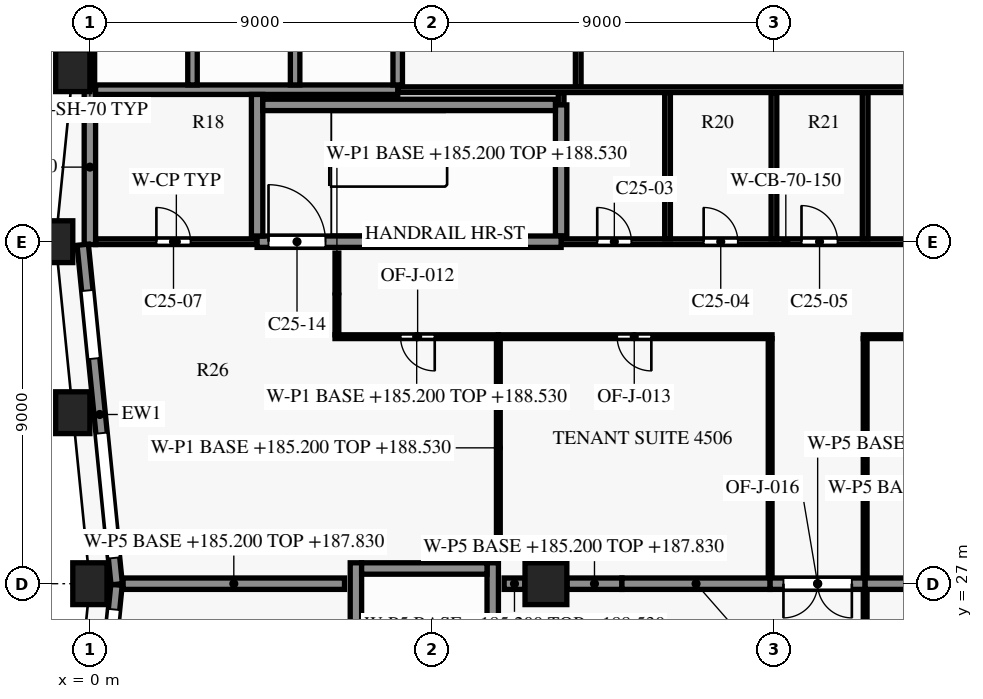
"""IFC4 building model, lengths in metres.
Left out: names, types, materials, properties, quantities, classifications, styles, units other than length and angle.
Written with IfcOpenShell. Run it as: python <this file> out.ifc"""

import sys

from ifc_helpers import new_model, si_unit, direction, frame, frame_2d, origin, origin_2d, place, context, subcontext, project, spatial, rectangle, extrude, element, fill, save


model = new_model("IFC4")
c1 = context("Model", 3, precision=1e-05, world=origin(), true_north=direction((0.0, 1.0)))
c2 = subcontext(c1, "Body", "Model", "MODEL_VIEW")
j1 = project(units=[si_unit("LENGTHUNIT", "METRE"), si_unit("PLANEANGLEUNIT", "RADIAN")], contexts=[c1])
p1 = place(None, origin())
s1 = spatial("IfcSite", under=j1, at=p1, CompositionType="ELEMENT")
p2 = place(p1, origin())
s2 = spatial("IfcBuilding", under=s1, at=p2, CompositionType="ELEMENT")
p3 = place(p2, frame((0.0, 0.0, 185.2)))
s3 = spatial("IfcBuildingStorey", under=s2, at=p3, CompositionType="ELEMENT", Elevation=185.2)
for number, where, z_axis, x_axis in (
    (1, (-0.45, 40.5, 0.0), (0.0, 0.0, 1.0), (-0.1, -0.995, 0.0)),
    (2, (-0.9, 36.0, 0.0), (0.0, 0.0, 1.0), (0.0, -1.0, 0.0)),
    (3, (-0.45, 31.5, 0.0), (0.0, 0.0, 1.0), (0.1, -0.995, 0.0)),
    (4, (0.0, 27.0, 0.0), (0.0, 0.0, 1.0), (0.0, -1.0, 0.0)),
):
    element("IfcColumn", number, at=place(p3, frame(where, z_axis=z_axis, x_axis=x_axis)), inside=s3, PredefinedType="COLUMN", context=c2, shape_type="SweptSolid", body=[
        extrude(rectangle(XDim=0.9, YDim=1.1, at=origin_2d()), origin(), (0.0, 0.0, 1.0), 3.8),
    ])
p4 = place(p3, frame((12.0, 27.0, 0.0), z_axis=(0.0, 0.0, 1.0), x_axis=(1.0, 0.0, 0.0)))
e5 = element("IfcColumn", 5, at=p4, inside=s3, PredefinedType="COLUMN", context=c2, shape_type="SweptSolid", body=[
    extrude(rectangle(XDim=1.1, YDim=1.1, at=origin_2d()), origin(), (0.0, 0.0, 1.0), 3.8),
])
p5 = place(p3, frame((0.705, 26.985, 0.0), z_axis=(0.0, 0.0, 1.0), x_axis=(-0.099533329093, 0.995034228758, 0.0)))
e6 = element("IfcWall", 6, at=p5, inside=s3, PredefinedType="SOLIDWALL", context=c2, shape_type="SweptSolid", body=[
    extrude(rectangle(XDim=8.98, YDim=0.3, at=frame_2d((4.49, 0.0))), origin(), (0.0, 0.0, 1.0), 3.15),
])
p6 = place(p5, frame((0.696, 0.0, 0.15)))
e7 = element("IfcOpeningElement", 7, at=p6, cuts=e6, PredefinedType="OPENING", context=c2, shape_type="SweptSolid", body=[
    extrude(rectangle(XDim=3.3, YDim=2.4, at=frame_2d((1.65, 1.2))), frame((0.0, 0.16, 0.0), z_axis=(0.0, -1.0, 0.0), x_axis=(1.0, 0.0, 0.0)), (0.0, 0.0, 1.0), 0.32),
])
p7 = place(p5, frame((5.969, 0.0, 0.75)))
e8 = element("IfcOpeningElement", 8, at=p7, cuts=e6, PredefinedType="OPENING", context=c2, shape_type="SweptSolid", body=[
    extrude(rectangle(XDim=1.8, YDim=1.8, at=frame_2d((0.9, 0.9))), frame((0.0, 0.16, 0.0), z_axis=(0.0, -1.0, 0.0), x_axis=(1.0, 0.0, 0.0)), (0.0, 0.0, 1.0), 0.32),
])
p8 = place(p3, frame((-0.198, 17.985, 0.0), z_axis=(0.0, 0.0, 1.0), x_axis=(0.099495688264, 0.995037993253, 0.0)))
e9 = element("IfcWall", 9, at=p8, inside=s3, PredefinedType="SOLIDWALL", context=c2, shape_type="SweptSolid", body=[
    extrude(rectangle(XDim=9.03, YDim=0.3, at=frame_2d((4.515, 0.0))), origin(), (0.0, 0.0, 1.0), 3.15),
])
p9 = place(p8, frame((1.306, 0.0, 0.75)))
e10 = element("IfcOpeningElement", 10, at=p9, cuts=e9, PredefinedType="OPENING", context=c2, shape_type="SweptSolid", body=[
    extrude(rectangle(XDim=1.8, YDim=1.8, at=frame_2d((0.9, 0.9))), frame((0.0, 0.16, 0.0), z_axis=(0.0, -1.0, 0.0), x_axis=(1.0, 0.0, 0.0)), (0.0, 0.0, 1.0), 0.32),
])
p10 = place(p8, frame((5.079, 0.0, 0.15)))
e11 = element("IfcOpeningElement", 11, at=p10, cuts=e9, PredefinedType="OPENING", context=c2, shape_type="SweptSolid", body=[
    extrude(rectangle(XDim=3.3, YDim=2.4, at=frame_2d((1.65, 1.2))), frame((0.0, 0.16, 0.0), z_axis=(0.0, -1.0, 0.0), x_axis=(1.0, 0.0, 0.0)), (0.0, 0.0, 1.0), 0.32),
])
p11 = place(p3, frame((7.15, 27.4, 0.0), z_axis=(0.0, 0.0, 1.0), x_axis=(1.0, 0.0, 0.0)))
e12 = element("IfcWall", 12, at=p11, inside=s3, PredefinedType="SHEAR", context=c2, shape_type="SweptSolid", body=[
    extrude(rectangle(XDim=3.3, YDim=0.3, at=frame_2d((1.65, 0.0))), origin(), (0.0, 0.0, 1.0), 3.5),
])
p12 = place(p3, frame((0.15, 36.0, 0.0), z_axis=(0.0, 0.0, 1.0), x_axis=(1.0, 0.0, 0.0)))
e13 = element("IfcWall", 13, at=p12, inside=s3, PredefinedType="PARTITIONING", context=c2, shape_type="SweptSolid", body=[
    extrude(rectangle(XDim=4.25, YDim=0.15, at=frame_2d((2.125, 0.0))), origin(), (0.0, 0.0, 1.0), 3.5),
])
p13 = place(p12, frame((1.6, 0.0, 0.0)))
e14 = element("IfcOpeningElement", 14, at=p13, cuts=e13, PredefinedType="OPENING", context=c2, shape_type="SweptSolid", body=[
    extrude(rectangle(XDim=0.9, YDim=2.1, at=frame_2d((0.45, 1.05))), frame((0.0, 0.085, 0.0), z_axis=(0.0, -1.0, 0.0), x_axis=(1.0, 0.0, 0.0)), (0.0, 0.0, 1.0), 0.17),
])
p14 = place(p3, frame((12.4, 36.0, 0.0), z_axis=(0.0, 0.0, 1.0), x_axis=(1.0, 0.0, 0.0)))
e15 = element("IfcWall", 15, at=p14, inside=s3, PredefinedType="SHEAR", context=c2, shape_type="SweptSolid", body=[
    extrude(rectangle(XDim=11.825, YDim=0.15, at=frame_2d((5.913, 0.0))), origin(), (0.0, 0.0, 1.0), 3.5),
])
p15 = place(p14, frame((0.95, 0.0, 0.0)))
e16 = element("IfcOpeningElement", 16, at=p15, cuts=e15, PredefinedType="OPENING", context=c2, shape_type="SweptSolid", body=[
    extrude(rectangle(XDim=0.9, YDim=2.1, at=frame_2d((0.45, 1.05))), frame((0.0, 0.085, 0.0), z_axis=(0.0, -1.0, 0.0), x_axis=(1.0, 0.0, 0.0)), (0.0, 0.0, 1.0), 0.17),
])
p16 = place(p14, frame((3.75, 0.0, 0.0)))
e17 = element("IfcOpeningElement", 17, at=p16, cuts=e15, PredefinedType="OPENING", context=c2, shape_type="SweptSolid", body=[
    extrude(rectangle(XDim=0.9, YDim=2.1, at=frame_2d((0.45, 1.05))), frame((0.0, 0.085, 0.0), z_axis=(0.0, -1.0, 0.0), x_axis=(1.0, 0.0, 0.0)), (0.0, 0.0, 1.0), 0.17),
])
p17 = place(p14, frame((6.325, 0.0, 0.0)))
e18 = element("IfcOpeningElement", 18, at=p17, cuts=e15, PredefinedType="OPENING", context=c2, shape_type="SweptSolid", body=[
    extrude(rectangle(XDim=0.95, YDim=2.1, at=frame_2d((0.475, 1.05))), frame((0.0, 0.085, 0.0), z_axis=(0.0, -1.0, 0.0), x_axis=(1.0, 0.0, 0.0)), (0.0, 0.0, 1.0), 0.17),
])
p18 = place(p14, frame((9.5, 0.0, 0.0)))
e19 = element("IfcOpeningElement", 19, at=p18, cuts=e15, PredefinedType="OPENING", context=c2, shape_type="SweptSolid", body=[
    extrude(rectangle(XDim=0.9, YDim=2.1, at=frame_2d((0.45, 1.05))), frame((0.0, 0.085, 0.0), z_axis=(0.0, -1.0, 0.0), x_axis=(1.0, 0.0, 0.0)), (0.0, 0.0, 1.0), 0.17),
])
p19 = place(p3, frame((4.4, 36.0, 0.0), z_axis=(0.0, 0.0, 1.0), x_axis=(1.0, 0.0, 0.0)))
e20 = element("IfcWall", 20, at=p19, inside=s3, PredefinedType="SHEAR", context=c2, shape_type="SweptSolid", body=[
    extrude(rectangle(XDim=8.0, YDim=0.3, at=frame_2d((4.0, 0.0))), origin(), (0.0, 0.0, 1.0), 3.5),
])
p20 = place(p19, frame((0.3, 0.0, 0.0)))
e21 = element("IfcOpeningElement", 21, at=p20, cuts=e20, PredefinedType="OPENING", context=c2, shape_type="SweptSolid", body=[
    extrude(rectangle(XDim=1.5, YDim=2.2, at=frame_2d((0.75, 1.1))), frame((0.0, 0.16, 0.0), z_axis=(0.0, -1.0, 0.0), x_axis=(1.0, 0.0, 0.0)), (0.0, 0.0, 1.0), 0.32),
])
p21 = place(p3, frame((4.55, 39.6, 0.0), z_axis=(0.0, 0.0, 1.0), x_axis=(1.0, 0.0, 0.0)))
e22 = element("IfcWall", 22, at=p21, inside=s3, PredefinedType="SHEAR", context=c2, shape_type="SweptSolid", body=[
    extrude(rectangle(XDim=7.7, YDim=0.3, at=frame_2d((3.85, 0.0))), origin(), (0.0, 0.0, 1.0), 3.5),
])
p22 = place(p3, frame((8.1, 40.0, 0.0), z_axis=(0.0, 0.0, 1.0), x_axis=(1.0, 0.0, 0.0)))
e23 = element("IfcWall", 23, at=p22, inside=s3, PredefinedType="PARTITIONING", context=c2, shape_type="SweptSolid", body=[
    extrude(rectangle(XDim=16.125, YDim=0.15, at=frame_2d((8.062, 0.0))), origin(), (0.0, 0.0, 1.0), 3.5),
])
p23 = place(p3, frame((0.15, 40.0, 0.0), z_axis=(0.0, 0.0, 1.0), x_axis=(1.0, 0.0, 0.0)))
e24 = element("IfcWall", 24, at=p23, inside=s3, PredefinedType="SHEAR", context=c2, shape_type="SweptSolid", body=[
    extrude(rectangle(XDim=7.95, YDim=0.25, at=frame_2d((3.975, 0.0))), origin(), (0.0, 0.0, 1.0), 3.5),
])
p24 = place(p3, frame((0.0, 35.925, 0.0), z_axis=(0.0, 0.0, 1.0), x_axis=(0.0, 1.0, 0.0)))
e25 = element("IfcWall", 25, at=p24, inside=s3, PredefinedType="SHEAR", context=c2, shape_type="SweptSolid", body=[
    extrude(rectangle(XDim=4.075, YDim=0.3, at=frame_2d((2.038, 0.0))), origin(), (0.0, 0.0, 1.0), 3.5),
])
p25 = place(p3, frame((0.0, 40.0, 0.0), z_axis=(0.0, 0.0, 1.0), x_axis=(0.0, 1.0, 0.0)))
e26 = element("IfcWall", 26, at=p25, inside=s3, PredefinedType="SHEAR", context=c2, shape_type="SweptSolid", body=[
    extrude(rectangle(XDim=3.325, YDim=0.25, at=frame_2d((1.663, 0.0))), origin(), (0.0, 0.0, 1.0), 3.5),
])
p26 = place(p3, frame((2.7, 40.125, 0.0), z_axis=(0.0, 0.0, 1.0), x_axis=(0.0, 1.0, 0.0)))
e27 = element("IfcWall", 27, at=p26, inside=s3, PredefinedType="SHEAR", context=c2, shape_type="SweptSolid", body=[
    extrude(rectangle(XDim=2.95, YDim=0.25, at=frame_2d((1.475, 0.0))), origin(), (0.0, 0.0, 1.0), 3.5),
])
p27 = place(p3, frame((4.4, 36.15, 0.0), z_axis=(0.0, 0.0, 1.0), x_axis=(0.0, 1.0, 0.0)))
e28 = element("IfcWall", 28, at=p27, inside=s3, PredefinedType="SHEAR", context=c2, shape_type="SweptSolid", body=[
    extrude(rectangle(XDim=3.725, YDim=0.3, at=frame_2d((1.863, 0.0))), origin(), (0.0, 0.0, 1.0), 3.5),
])
p28 = place(p3, frame((5.4, 40.125, 0.0), z_axis=(0.0, 0.0, 1.0), x_axis=(0.0, 1.0, 0.0)))
e29 = element("IfcWall", 29, at=p28, inside=s3, PredefinedType="SHEAR", context=c2, shape_type="SweptSolid", body=[
    extrude(rectangle(XDim=2.95, YDim=0.25, at=frame_2d((1.475, 0.0))), origin(), (0.0, 0.0, 1.0), 3.5),
])
p29 = place(p3, frame((7.0, 19.25, 0.0), z_axis=(0.0, 0.0, 1.0), x_axis=(0.0, 1.0, 0.0)))
e30 = element("IfcWall", 30, at=p29, inside=s3, PredefinedType="SHEAR", context=c2, shape_type="SweptSolid", body=[
    extrude(rectangle(XDim=8.3, YDim=0.3, at=frame_2d((4.15, 0.0))), origin(), (0.0, 0.0, 1.0), 3.5),
])
p30 = place(p3, frame((8.1, 40.125, 0.0), z_axis=(0.0, 0.0, 1.0), x_axis=(0.0, 1.0, 0.0)))
e31 = element("IfcWall", 31, at=p30, inside=s3, PredefinedType="SHEAR", context=c2, shape_type="SweptSolid", body=[
    extrude(rectangle(XDim=2.95, YDim=0.25, at=frame_2d((1.475, 0.0))), origin(), (0.0, 0.0, 1.0), 3.5),
])
p31 = place(p3, frame((10.6, 19.25, 0.0), z_axis=(0.0, 0.0, 1.0), x_axis=(0.0, 1.0, 0.0)))
e32 = element("IfcWall", 32, at=p31, inside=s3, PredefinedType="SHEAR", context=c2, shape_type="SweptSolid", body=[
    extrude(rectangle(XDim=8.3, YDim=0.3, at=frame_2d((4.15, 0.0))), origin(), (0.0, 0.0, 1.0), 3.5),
])
p32 = place(p31, frame((0.55, 0.0, 0.0)))
e33 = element("IfcOpeningElement", 33, at=p32, cuts=e32, PredefinedType="OPENING", context=c2, shape_type="SweptSolid", body=[
    extrude(rectangle(XDim=1.2, YDim=2.2, at=frame_2d((0.6, 1.1))), frame((0.0, 0.16, 0.0), z_axis=(0.0, -1.0, 0.0), x_axis=(1.0, 0.0, 0.0)), (0.0, 0.0, 1.0), 0.32),
])
p33 = place(p3, frame((12.4, 39.6, 0.0), z_axis=(0.0, 0.0, 1.0), x_axis=(0.0, 1.0, 0.0)))
e34 = element("IfcWall", 34, at=p33, inside=s3, PredefinedType="PARTITIONING", context=c2, shape_type="SweptSolid", body=[
    extrude(rectangle(XDim=0.325, YDim=0.15, at=frame_2d((0.163, 0.0))), origin(), (0.0, 0.0, 1.0), 3.5),
])
p34 = place(p3, frame((12.4, 36.15, 0.0), z_axis=(0.0, 0.0, 1.0), x_axis=(0.0, 1.0, 0.0)))
e35 = element("IfcWall", 35, at=p34, inside=s3, PredefinedType="SHEAR", context=c2, shape_type="SweptSolid", body=[
    extrude(rectangle(XDim=3.45, YDim=0.3, at=frame_2d((1.725, 0.0))), origin(), (0.0, 0.0, 1.0), 3.5),
])
p35 = place(p3, frame((12.85, 40.075, 0.0), z_axis=(0.0, 0.0, 1.0), x_axis=(0.0, 1.0, 0.0)))
e36 = element("IfcWall", 36, at=p35, inside=s3, PredefinedType="PARTITIONING", context=c2, shape_type="SweptSolid", body=[
    extrude(rectangle(XDim=3.05, YDim=0.15, at=frame_2d((1.525, 0.0))), origin(), (0.0, 0.0, 1.0), 3.5),
])
for number, where, z_axis, x_axis in (
    (37, (15.2, 36.075, 0.0), (0.0, 0.0, 1.0), (0.0, 1.0, 0.0)),
    (38, (18.0, 36.075, 0.0), (0.0, 0.0, 1.0), (0.0, 1.0, 0.0)),
    (39, (20.4, 36.075, 0.0), (0.0, 0.0, 1.0), (0.0, 1.0, 0.0)),
):
    element("IfcWall", number, at=place(p3, frame(where, z_axis=z_axis, x_axis=x_axis)), inside=s3, PredefinedType="PARTITIONING", context=c2, shape_type="SweptSolid", body=[
        extrude(rectangle(XDim=3.85, YDim=0.15, at=frame_2d((1.925, 0.0))), origin(), (0.0, 0.0, 1.0), 3.5),
    ])
p36 = place(p3, frame((20.4, 26.83, 0.0), z_axis=(0.0, 0.0, 1.0), x_axis=(0.0, -1.0, 0.0)))
e40 = element("IfcWall", 40, at=p36, inside=s3, PredefinedType="PARTITIONING", context=c2, shape_type="SweptSolid", body=[
    extrude(rectangle(XDim=14.48, YDim=0.1, at=frame_2d((7.24, 0.0))), origin(), (0.0, 0.0, 1.0), 2.63),
])
p37 = place(p36, frame((6.73, 0.0, 0.0)))
e41 = element("IfcOpeningElement", 41, at=p37, cuts=e40, PredefinedType="OPENING", context=c2, shape_type="SweptSolid", body=[
    extrude(rectangle(XDim=0.9, YDim=2.1, at=frame_2d((0.45, 1.05))), frame((0.0, 0.06, 0.0), z_axis=(0.0, -1.0, 0.0), x_axis=(1.0, 0.0, 0.0)), (0.0, 0.0, 1.0), 0.12),
])
p38 = place(p3, frame((0.874, 27.0, 0.0), z_axis=(0.0, 0.0, 1.0), x_axis=(1.0, 0.0, 0.0)))
e42 = element("IfcWall", 42, at=p38, inside=s3, PredefinedType="PARTITIONING", context=c2, shape_type="SweptSolid", body=[
    extrude(rectangle(XDim=5.826, YDim=0.3, at=frame_2d((2.913, 0.0))), origin(), (0.0, 0.0, 1.0), 2.63),
])
p39 = place(p3, frame((10.9, 27.0, 0.0), z_axis=(0.0, 0.0, 1.0), x_axis=(1.0, 0.0, 0.0)))
e43 = element("IfcWall", 43, at=p39, inside=s3, PredefinedType="PARTITIONING", context=c2, shape_type="SweptSolid", body=[
    extrude(rectangle(XDim=0.545, YDim=0.3, at=frame_2d((0.272, 0.0))), origin(), (0.0, 0.0, 1.0), 3.33),
])
p40 = place(p3, frame((12.555, 27.0, 0.0), z_axis=(0.0, 0.0, 1.0), x_axis=(1.0, 0.0, 0.0)))
e44 = element("IfcWall", 44, at=p40, inside=s3, PredefinedType="PARTITIONING", context=c2, shape_type="SweptSolid", body=[
    extrude(rectangle(XDim=1.445, YDim=0.3, at=frame_2d((0.723, 0.0))), origin(), (0.0, 0.0, 1.0), 2.63),
])
p41 = place(p3, frame((14.0, 27.0, 0.0), z_axis=(0.0, 0.0, 1.0), x_axis=(1.0, 0.0, 0.0)))
e45 = element("IfcWall", 45, at=p41, inside=s3, PredefinedType="PARTITIONING", context=c2, shape_type="SweptSolid", body=[
    extrude(rectangle(XDim=3.9, YDim=0.3, at=frame_2d((1.95, 0.0))), origin(), (0.0, 0.0, 1.0), 2.63),
])
p42 = place(p3, frame((20.4, 27.0, 0.0), z_axis=(0.0, 0.0, 1.0), x_axis=(-1.0, 0.0, 0.0)))
e46 = element("IfcWall", 46, at=p42, inside=s3, PredefinedType="PARTITIONING", context=c2, shape_type="SweptSolid", body=[
    extrude(rectangle(XDim=2.5, YDim=0.3, at=frame_2d((1.25, 0.0))), origin(), (0.0, 0.0, 1.0), 2.63),
])
p43 = place(p42, frame((0.35, 0.0, 0.0)))
e47 = element("IfcOpeningElement", 47, at=p43, cuts=e46, PredefinedType="OPENING", context=c2, shape_type="SweptSolid", body=[
    extrude(rectangle(XDim=1.8, YDim=2.1, at=frame_2d((0.9, 1.05))), frame((0.0, 0.16, 0.0), z_axis=(0.0, -1.0, 0.0), x_axis=(1.0, 0.0, 0.0)), (0.0, 0.0, 1.0), 0.32),
])
p44 = place(p3, frame((20.4, 27.0, 0.0), z_axis=(0.0, 0.0, 1.0), x_axis=(1.0, 0.0, 0.0)))
e48 = element("IfcWall", 48, at=p44, inside=s3, PredefinedType="PARTITIONING", context=c2, shape_type="SweptSolid", body=[
    extrude(rectangle(XDim=3.045, YDim=0.3, at=frame_2d((1.522, 0.0))), origin(), (0.0, 0.0, 1.0), 2.63),
])
p45 = place(p3, frame((17.9, 27.17, 0.0), z_axis=(0.0, 0.0, 1.0), x_axis=(0.0, 1.0, 0.0)))
e49 = element("IfcWall", 49, at=p45, inside=s3, PredefinedType="PARTITIONING", context=c2, shape_type="SweptSolid", body=[
    extrude(rectangle(XDim=6.28, YDim=0.1, at=frame_2d((3.14, 0.0))), origin(), (0.0, 0.0, 1.0), 2.63),
])
p46 = place(p3, frame((10.748, 33.45, 0.0), z_axis=(0.0, 0.0, 1.0), x_axis=(0.0, -1.0, 0.0)))
e50 = element("IfcWall", 50, at=p46, inside=s3, PredefinedType="PARTITIONING", context=c2, shape_type="SweptSolid", body=[
    extrude(rectangle(XDim=5.75, YDim=0.1, at=frame_2d((2.875, 0.0))), origin(), (0.0, 0.0, 1.0), 3.33),
])
p47 = place(p3, frame((20.4, 33.45, 0.0), z_axis=(0.0, 0.0, 1.0), x_axis=(0.0, -1.0, 0.0)))
e51 = element("IfcWall", 51, at=p47, inside=s3, PredefinedType="PARTITIONING", context=c2, shape_type="SweptSolid", body=[
    extrude(rectangle(XDim=6.28, YDim=0.1, at=frame_2d((3.14, 0.0))), origin(), (0.0, 0.0, 1.0), 2.63),
])
p48 = place(p3, frame((10.748, 33.5, 0.0), z_axis=(0.0, 0.0, 1.0), x_axis=(-1.0, 0.0, 0.0)))
e52 = element("IfcWall", 52, at=p48, inside=s3, PredefinedType="PARTITIONING", context=c2, shape_type="SweptSolid", body=[
    extrude(rectangle(XDim=4.298, YDim=0.1, at=frame_2d((2.149, 0.0))), origin(), (0.0, 0.0, 1.0), 3.33),
])
p49 = place(p48, frame((1.674, 0.0, 0.0)))
e53 = element("IfcOpeningElement", 53, at=p49, cuts=e52, PredefinedType="OPENING", context=c2, shape_type="SweptSolid", body=[
    extrude(rectangle(XDim=0.9, YDim=2.1, at=frame_2d((0.45, 1.05))), frame((0.0, 0.06, 0.0), z_axis=(0.0, -1.0, 0.0), x_axis=(1.0, 0.0, 0.0)), (0.0, 0.0, 1.0), 0.12),
])
p50 = place(p3, frame((17.95, 33.5, 0.0), z_axis=(0.0, 0.0, 1.0), x_axis=(-1.0, 0.0, 0.0)))
e54 = element("IfcWall", 54, at=p50, inside=s3, PredefinedType="PARTITIONING", context=c2, shape_type="SweptSolid", body=[
    extrude(rectangle(XDim=7.202, YDim=0.1, at=frame_2d((3.601, 0.0))), origin(), (0.0, 0.0, 1.0), 2.63),
])
p51 = place(p50, frame((3.176, 0.0, 0.0)))
e55 = element("IfcOpeningElement", 55, at=p51, cuts=e54, PredefinedType="OPENING", context=c2, shape_type="SweptSolid", body=[
    extrude(rectangle(XDim=0.9, YDim=2.1, at=frame_2d((0.45, 1.05))), frame((0.0, 0.06, 0.0), z_axis=(0.0, -1.0, 0.0), x_axis=(1.0, 0.0, 0.0)), (0.0, 0.0, 1.0), 0.12),
])
p52 = place(p3, frame((31.05, 33.5, 0.0), z_axis=(0.0, 0.0, 1.0), x_axis=(-1.0, 0.0, 0.0)))
e56 = element("IfcWall", 56, at=p52, inside=s3, PredefinedType="PARTITIONING", context=c2, shape_type="SweptSolid", body=[
    extrude(rectangle(XDim=10.7, YDim=0.1, at=frame_2d((5.35, 0.0))), origin(), (0.0, 0.0, 1.0), 2.63),
])
p53 = place(p3, frame((6.5, 33.55, 0.0), z_axis=(0.0, 0.0, 1.0), x_axis=(0.0, 1.0, 0.0)))
e57 = element("IfcWall", 57, at=p53, inside=s3, PredefinedType="PARTITIONING", context=c2, shape_type="SweptSolid", body=[
    extrude(rectangle(XDim=2.15, YDim=0.1, at=frame_2d((1.075, 0.0))), origin(), (0.0, 0.0, 1.0), 3.33),
])
p54 = place(p6, origin())
e58 = element("IfcWindow", 58, at=p54, inside=s3, PartitioningType="SINGLE_PANEL", PredefinedType="WINDOW", context=c2, shape_type="SweptSolid", body=[
    extrude(rectangle(XDim=3.3, YDim=2.4, at=frame_2d((1.65, 1.2))), frame((0.0, 0.03, 0.0), z_axis=(0.0, -1.0, 0.0), x_axis=(1.0, 0.0, 0.0)), (0.0, 0.0, 1.0), 0.06),
])
fill(e7, e58)
p55 = place(p7, origin())
e59 = element("IfcWindow", 59, at=p55, inside=s3, PartitioningType="SINGLE_PANEL", PredefinedType="WINDOW", context=c2, shape_type="SweptSolid", body=[
    extrude(rectangle(XDim=1.8, YDim=1.8, at=frame_2d((0.9, 0.9))), frame((0.0, 0.03, 0.0), z_axis=(0.0, -1.0, 0.0), x_axis=(1.0, 0.0, 0.0)), (0.0, 0.0, 1.0), 0.06),
])
fill(e8, e59)
p56 = place(p10, origin())
e60 = element("IfcWindow", 60, at=p56, inside=s3, PartitioningType="SINGLE_PANEL", PredefinedType="WINDOW", context=c2, shape_type="SweptSolid", body=[
    extrude(rectangle(XDim=3.3, YDim=2.4, at=frame_2d((1.65, 1.2))), frame((0.0, 0.03, 0.0), z_axis=(0.0, -1.0, 0.0), x_axis=(1.0, 0.0, 0.0)), (0.0, 0.0, 1.0), 0.06),
])
fill(e11, e60)
p57 = place(p15, origin())
e61 = element("IfcDoor", 61, at=p57, inside=s3, OperationType="SINGLE_SWING_RIGHT", PredefinedType="DOOR", context=c2, shape_type="SweptSolid", body=[
    extrude(rectangle(XDim=0.9, YDim=2.1, at=frame_2d((0.45, 1.05))), frame((0.0, 0.025, 0.0), z_axis=(0.0, -1.0, 0.0), x_axis=(1.0, 0.0, 0.0)), (0.0, 0.0, 1.0), 0.05),
])
fill(e16, e61)
p58 = place(p16, origin())
e62 = element("IfcDoor", 62, at=p58, inside=s3, OperationType="SINGLE_SWING_LEFT", PredefinedType="DOOR", context=c2, shape_type="SweptSolid", body=[
    extrude(rectangle(XDim=0.9, YDim=2.1, at=frame_2d((0.45, 1.05))), frame((0.0, 0.025, 0.0), z_axis=(0.0, -1.0, 0.0), x_axis=(1.0, 0.0, 0.0)), (0.0, 0.0, 1.0), 0.05),
])
fill(e17, e62)
p59 = place(p17, origin())
e63 = element("IfcDoor", 63, at=p59, inside=s3, OperationType="SINGLE_SWING_RIGHT", PredefinedType="DOOR", context=c2, shape_type="SweptSolid", body=[
    extrude(rectangle(XDim=0.95, YDim=2.1, at=frame_2d((0.475, 1.05))), frame((0.0, 0.025, 0.0), z_axis=(0.0, -1.0, 0.0), x_axis=(1.0, 0.0, 0.0)), (0.0, 0.0, 1.0), 0.05),
])
fill(e18, e63)
p60 = place(p13, origin())
e64 = element("IfcDoor", 64, at=p60, inside=s3, OperationType="SINGLE_SWING_LEFT", PredefinedType="DOOR", context=c2, shape_type="SweptSolid", body=[
    extrude(rectangle(XDim=0.9, YDim=2.1, at=frame_2d((0.45, 1.05))), frame((0.0, 0.025, 0.0), z_axis=(0.0, -1.0, 0.0), x_axis=(1.0, 0.0, 0.0)), (0.0, 0.0, 1.0), 0.05),
])
fill(e14, e64)
p61 = place(p20, origin())
e65 = element("IfcDoor", 65, at=p61, inside=s3, OperationType="SINGLE_SWING_RIGHT", PredefinedType="DOOR", context=c2, shape_type="SweptSolid", body=[
    extrude(rectangle(XDim=1.5, YDim=2.2, at=frame_2d((0.75, 1.1))), frame((0.0, 0.025, 0.0), z_axis=(0.0, -1.0, 0.0), x_axis=(1.0, 0.0, 0.0)), (0.0, 0.0, 1.0), 0.05),
])
fill(e21, e65)
p62 = place(p49, origin())
e66 = element("IfcDoor", 66, at=p62, inside=s3, OperationType="SINGLE_SWING_RIGHT", PredefinedType="DOOR", context=c2, shape_type="SweptSolid", body=[
    extrude(rectangle(XDim=0.9, YDim=2.1, at=frame_2d((0.45, 1.05))), frame((0.0, 0.025, 0.0), z_axis=(0.0, -1.0, 0.0), x_axis=(1.0, 0.0, 0.0)), (0.0, 0.0, 1.0), 0.05),
])
fill(e53, e66)
p63 = place(p51, origin())
e67 = element("IfcDoor", 67, at=p63, inside=s3, OperationType="SINGLE_SWING_RIGHT", PredefinedType="DOOR", context=c2, shape_type="SweptSolid", body=[
    extrude(rectangle(XDim=0.9, YDim=2.1, at=frame_2d((0.45, 1.05))), frame((0.0, 0.025, 0.0), z_axis=(0.0, -1.0, 0.0), x_axis=(1.0, 0.0, 0.0)), (0.0, 0.0, 1.0), 0.05),
])
fill(e55, e67)
p64 = place(p43, origin())
e68 = element("IfcDoor", 68, at=p64, inside=s3, OperationType="DOUBLE_DOOR_SINGLE_SWING", PredefinedType="DOOR", context=c2, shape_type="SweptSolid", body=[
    extrude(rectangle(XDim=1.8, YDim=2.1, at=frame_2d((0.9, 1.05))), frame((0.0, 0.025, 0.0), z_axis=(0.0, -1.0, 0.0), x_axis=(1.0, 0.0, 0.0)), (0.0, 0.0, 1.0), 0.05),
])
fill(e47, e68)
save(model, sys.argv[1])
